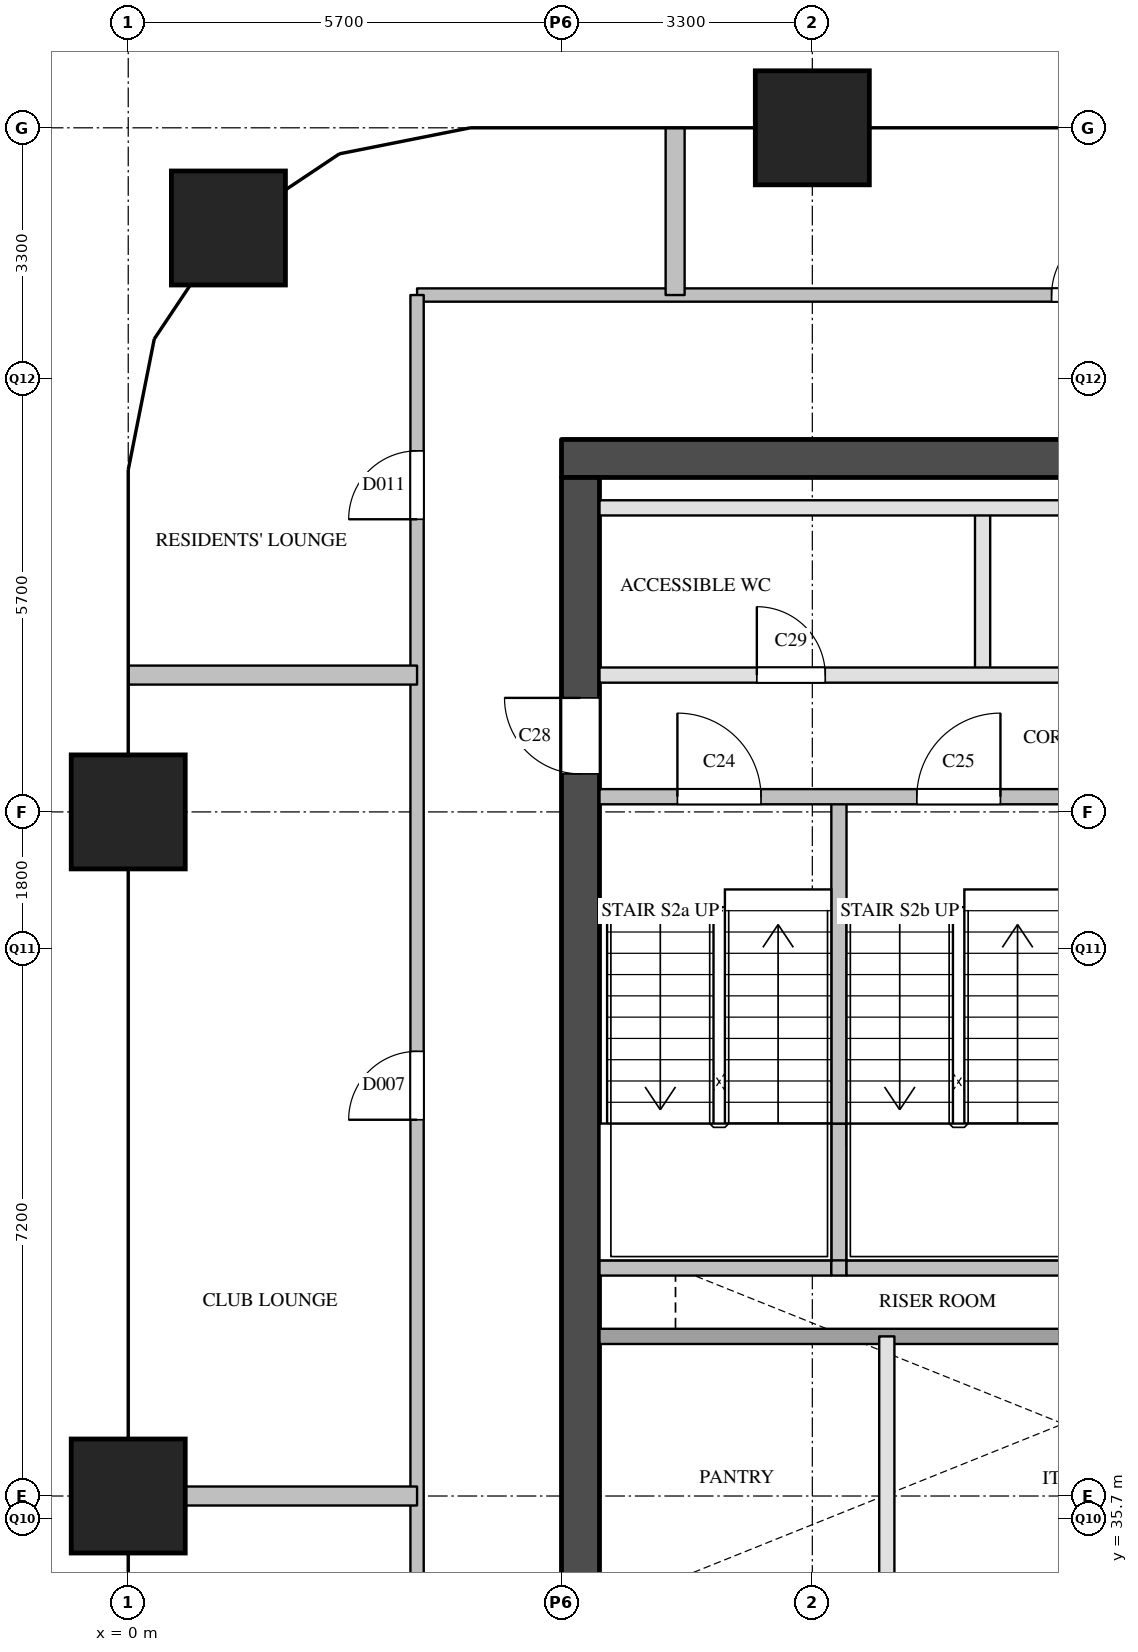
"""IFC4 building model, lengths in metres.
Left out: names, types, materials, properties, quantities, classifications, styles, units other than length and angle.
Written with IfcOpenShell. Run it as: python <this file> out.ifc"""

import sys

from ifc_helpers import new_model, si_unit, direction, frame, frame_2d, origin, origin_2d, place, context, subcontext, project, spatial, rectangle, extrude, element, fill, save


model = new_model("IFC4")
c1 = context("Model", 3, precision=1e-05, world=origin(), true_north=direction((0.0, 1.0)))
c2 = subcontext(c1, "Body", "Model", "MODEL_VIEW")
j1 = project(units=[si_unit("LENGTHUNIT", "METRE"), si_unit("PLANEANGLEUNIT", "RADIAN")], contexts=[c1])
p1 = place(None, origin())
s1 = spatial("IfcSite", under=j1, at=p1, CompositionType="ELEMENT")
p2 = place(p1, origin())
s2 = spatial("IfcBuilding", under=s1, at=p2, CompositionType="ELEMENT")
p3 = place(p2, frame((0.0, 0.0, 185.6)))
s3 = spatial("IfcBuildingStorey", under=s2, at=p3, CompositionType="ELEMENT", Elevation=185.6)
for number, where, z_axis, x_axis in (
    (1, (0.0, 36.0, 0.0), (0.0, 0.0, 1.0), (1.0, 0.0, 0.0)),
    (2, (0.0, 45.0, 0.0), (0.0, 0.0, 1.0), (1.0, 0.0, 0.0)),
    (3, (1.318, 52.682, 0.0), (0.0, 0.0, 1.0), (1.0, 0.0, 0.0)),
    (4, (9.0, 54.0, 0.0), (0.0, 0.0, 1.0), (1.0, 0.0, 0.0)),
):
    element("IfcColumn", number, at=place(p3, frame(where, z_axis=z_axis, x_axis=x_axis)), inside=s3, PredefinedType="COLUMN", context=c2, shape_type="SweptSolid", body=[
        extrude(rectangle(XDim=1.5, YDim=1.5, at=origin_2d()), origin(), (0.0, 0.0, 1.0), 3.9),
    ])
p4 = place(p3, frame((5.7, 49.65, 0.0), z_axis=(0.0, 0.0, 1.0), x_axis=(1.0, 0.0, 0.0)))
e5 = element("IfcWall", 5, at=p4, inside=s3, PredefinedType="SHEAR", context=c2, shape_type="SweptSolid", body=[
    extrude(rectangle(XDim=12.2, YDim=0.5, at=frame_2d((6.1, 0.0))), origin(), (0.0, 0.0, 1.0), 3.6),
])
p5 = place(p3, frame((5.95, 29.1, 0.0), z_axis=(0.0, 0.0, 1.0), x_axis=(0.0, 1.0, 0.0)))
e6 = element("IfcWall", 6, at=p5, inside=s3, PredefinedType="SHEAR", context=c2, shape_type="SweptSolid", body=[
    extrude(rectangle(XDim=20.3, YDim=0.5, at=frame_2d((10.15, 0.0))), origin(), (0.0, 0.0, 1.0), 3.6),
])
p6 = place(p5, frame((3.45, 0.0, 0.0)))
e7 = element("IfcOpeningElement", 7, at=p6, cuts=e6, PredefinedType="OPENING", context=c2, shape_type="SweptSolid", body=[
    extrude(rectangle(XDim=1.0, YDim=2.1, at=frame_2d((0.5, 1.05))), frame((0.0, 0.26, 0.0), z_axis=(0.0, -1.0, 0.0), x_axis=(1.0, 0.0, 0.0)), (0.0, 0.0, 1.0), 0.52),
])
p7 = place(p5, frame((16.4, 0.0, 0.0)))
e8 = element("IfcOpeningElement", 8, at=p7, cuts=e6, PredefinedType="OPENING", context=c2, shape_type="SweptSolid", body=[
    extrude(rectangle(XDim=1.0, YDim=2.1, at=frame_2d((0.5, 1.05))), frame((0.0, 0.26, 0.0), z_axis=(0.0, -1.0, 0.0), x_axis=(1.0, 0.0, 0.0)), (0.0, 0.0, 1.0), 0.52),
])
p8 = place(p3, frame((9.35, 39.0, 0.0), z_axis=(0.0, 0.0, 1.0), x_axis=(0.0, 1.0, 0.0)))
e9 = element("IfcWall", 9, at=p8, inside=s3, PredefinedType="SOLIDWALL", context=c2, shape_type="SweptSolid", body=[
    extrude(rectangle(XDim=1.9, YDim=0.2, at=frame_2d((0.95, 0.0))), origin(), (0.0, 0.0, 1.0), 3.6),
])
p9 = place(p3, frame((9.35, 40.9, 0.0), z_axis=(0.0, 0.0, 1.0), x_axis=(0.0, 1.0, 0.0)))
e10 = element("IfcWall", 10, at=p9, inside=s3, PredefinedType="SOLIDWALL", context=c2, shape_type="SweptSolid", body=[
    extrude(rectangle(XDim=4.3, YDim=0.2, at=frame_2d((2.15, 0.0))), origin(), (0.0, 0.0, 1.0), 3.6),
])
p10 = place(p3, frame((9.98, 33.8, 0.0), z_axis=(0.0, 0.0, 1.0), x_axis=(0.0, 1.0, 0.0)))
e11 = element("IfcWall", 11, at=p10, inside=s3, PredefinedType="PARTITIONING", context=c2, shape_type="SweptSolid", body=[
    extrude(rectangle(XDim=4.3, YDim=0.2, at=frame_2d((2.15, 0.0))), origin(), (0.0, 0.0, 1.0), 3.6),
])
p11 = place(p3, frame((11.24, 46.8, 0.0), z_axis=(0.0, 0.0, 1.0), x_axis=(0.0, 1.0, 0.0)))
e12 = element("IfcWall", 12, at=p11, inside=s3, PredefinedType="PARTITIONING", context=c2, shape_type="SweptSolid", body=[
    extrude(rectangle(XDim=2.2, YDim=0.2, at=frame_2d((1.1, 0.0))), origin(), (0.0, 0.0, 1.0), 3.6),
])
p12 = place(p3, frame((6.2, 38.1, 0.0), z_axis=(0.0, 0.0, 1.0), x_axis=(1.0, 0.0, 0.0)))
e13 = element("IfcWall", 13, at=p12, inside=s3, PredefinedType="SOLIDWALL", context=c2, shape_type="SweptSolid", body=[
    extrude(rectangle(XDim=11.2, YDim=0.2, at=frame_2d((5.6, 0.0))), origin(), (0.0, 0.0, 1.0), 3.6),
])
p13 = place(p12, frame((8.85, 0.0, 0.0)))
e14 = element("IfcOpeningElement", 14, at=p13, cuts=e13, PredefinedType="OPENING", context=c2, shape_type="SweptSolid", body=[
    extrude(rectangle(XDim=1.2, YDim=2.1, at=frame_2d((0.6, 1.05))), frame((0.0, 0.11, 0.0), z_axis=(0.0, -1.0, 0.0), x_axis=(1.0, 0.0, 0.0)), (0.0, 0.0, 1.0), 0.22),
])
p14 = place(p3, frame((6.2, 39.0, 0.0), z_axis=(0.0, 0.0, 1.0), x_axis=(1.0, 0.0, 0.0)))
e15 = element("IfcWall", 15, at=p14, inside=s3, PredefinedType="SOLIDWALL", context=c2, shape_type="SweptSolid", body=[
    extrude(rectangle(XDim=3.05, YDim=0.2, at=frame_2d((1.525, 0.0))), origin(), (0.0, 0.0, 1.0), 3.6),
])
p15 = place(p3, frame((9.25, 39.0, 0.0), z_axis=(0.0, 0.0, 1.0), x_axis=(1.0, 0.0, 0.0)))
e16 = element("IfcWall", 16, at=p15, inside=s3, PredefinedType="SOLIDWALL", context=c2, shape_type="SweptSolid", body=[
    extrude(rectangle(XDim=0.2, YDim=0.2, at=frame_2d((0.1, 0.0))), origin(), (0.0, 0.0, 1.0), 3.6),
])
p16 = place(p3, frame((9.45, 39.0, 0.0), z_axis=(0.0, 0.0, 1.0), x_axis=(1.0, 0.0, 0.0)))
e17 = element("IfcWall", 17, at=p16, inside=s3, PredefinedType="SOLIDWALL", context=c2, shape_type="SweptSolid", body=[
    extrude(rectangle(XDim=3.05, YDim=0.2, at=frame_2d((1.525, 0.0))), origin(), (0.0, 0.0, 1.0), 3.6),
])
p17 = place(p3, frame((6.2, 45.2, 0.0), z_axis=(0.0, 0.0, 1.0), x_axis=(1.0, 0.0, 0.0)))
e18 = element("IfcWall", 18, at=p17, inside=s3, PredefinedType="SOLIDWALL", context=c2, shape_type="SweptSolid", body=[
    extrude(rectangle(XDim=6.3, YDim=0.2, at=frame_2d((3.15, 0.0))), origin(), (0.0, 0.0, 1.0), 3.6),
])
p18 = place(p17, frame((1.025, 0.0, 0.0)))
e19 = element("IfcOpeningElement", 19, at=p18, cuts=e18, PredefinedType="OPENING", context=c2, shape_type="SweptSolid", body=[
    extrude(rectangle(XDim=1.1, YDim=2.1, at=frame_2d((0.55, 1.05))), frame((0.0, 0.11, 0.0), z_axis=(0.0, -1.0, 0.0), x_axis=(1.0, 0.0, 0.0)), (0.0, 0.0, 1.0), 0.22),
])
p19 = place(p17, frame((4.175, 0.0, 0.0)))
e20 = element("IfcOpeningElement", 20, at=p19, cuts=e18, PredefinedType="OPENING", context=c2, shape_type="SweptSolid", body=[
    extrude(rectangle(XDim=1.1, YDim=2.1, at=frame_2d((0.55, 1.05))), frame((0.0, 0.11, 0.0), z_axis=(0.0, -1.0, 0.0), x_axis=(1.0, 0.0, 0.0)), (0.0, 0.0, 1.0), 0.22),
])
p20 = place(p3, frame((6.2, 46.8, 0.0), z_axis=(0.0, 0.0, 1.0), x_axis=(1.0, 0.0, 0.0)))
e21 = element("IfcWall", 21, at=p20, inside=s3, PredefinedType="PARTITIONING", context=c2, shape_type="SweptSolid", body=[
    extrude(rectangle(XDim=11.2, YDim=0.2, at=frame_2d((5.6, 0.0))), origin(), (0.0, 0.0, 1.0), 3.6),
])
p21 = place(p20, frame((2.07, 0.0, 0.0)))
e22 = element("IfcOpeningElement", 22, at=p21, cuts=e21, PredefinedType="OPENING", context=c2, shape_type="SweptSolid", body=[
    extrude(rectangle(XDim=0.9, YDim=2.1, at=frame_2d((0.45, 1.05))), frame((0.0, 0.11, 0.0), z_axis=(0.0, -1.0, 0.0), x_axis=(1.0, 0.0, 0.0)), (0.0, 0.0, 1.0), 0.22),
])
p22 = place(p20, frame((7.67, 0.0, 0.0)))
e23 = element("IfcOpeningElement", 23, at=p22, cuts=e21, PredefinedType="OPENING", context=c2, shape_type="SweptSolid", body=[
    extrude(rectangle(XDim=0.9, YDim=2.1, at=frame_2d((0.45, 1.05))), frame((0.0, 0.11, 0.0), z_axis=(0.0, -1.0, 0.0), x_axis=(1.0, 0.0, 0.0)), (0.0, 0.0, 1.0), 0.22),
])
p23 = place(p3, frame((6.2, 49.0, 0.0), z_axis=(0.0, 0.0, 1.0), x_axis=(1.0, 0.0, 0.0)))
e24 = element("IfcWall", 24, at=p23, inside=s3, PredefinedType="PARTITIONING", context=c2, shape_type="SweptSolid", body=[
    extrude(rectangle(XDim=11.2, YDim=0.2, at=frame_2d((5.6, 0.0))), origin(), (0.0, 0.0, 1.0), 3.6),
])
p24 = place(p3, frame((3.8, 51.8, 0.0), z_axis=(0.0, 0.0, 1.0), x_axis=(1.0, 0.0, 0.0)))
e25 = element("IfcWall", 25, at=p24, inside=s3, PredefinedType="PARTITIONING", context=c2, shape_type="SweptSolid", body=[
    extrude(rectangle(XDim=16.0, YDim=0.175, at=frame_2d((8.0, 0.0))), origin(), (0.0, 0.0, 1.0), 3.6),
])
p25 = place(p24, frame((8.348, 0.0, 0.0)))
e26 = element("IfcOpeningElement", 26, at=p25, cuts=e25, PredefinedType="OPENING", context=c2, shape_type="SweptSolid", body=[
    extrude(rectangle(XDim=0.9, YDim=2.1, at=frame_2d((0.45, 1.05))), frame((0.0, 0.097, 0.0), z_axis=(0.0, -1.0, 0.0), x_axis=(1.0, 0.0, 0.0)), (0.0, 0.0, 1.0), 0.195),
])
p26 = place(p3, frame((3.8, 28.5, 0.0), z_axis=(0.0, 0.0, 1.0), x_axis=(0.0, 1.0, 0.0)))
e27 = element("IfcWall", 27, at=p26, inside=s3, PredefinedType="PARTITIONING", context=c2, shape_type="SweptSolid", body=[
    extrude(rectangle(XDim=23.3, YDim=0.175, at=frame_2d((11.65, 0.0))), origin(), (0.0, 0.0, 1.0), 3.6),
])
p27 = place(p26, frame((3.3, 0.0, 0.0)))
e28 = element("IfcOpeningElement", 28, at=p27, cuts=e27, PredefinedType="OPENING", context=c2, shape_type="SweptSolid", body=[
    extrude(rectangle(XDim=0.9, YDim=2.1, at=frame_2d((0.45, 1.05))), frame((0.0, 0.097, 0.0), z_axis=(0.0, -1.0, 0.0), x_axis=(1.0, 0.0, 0.0)), (0.0, 0.0, 1.0), 0.195),
])
p28 = place(p26, frame((12.45, 0.0, 0.0)))
e29 = element("IfcOpeningElement", 29, at=p28, cuts=e27, PredefinedType="OPENING", context=c2, shape_type="SweptSolid", body=[
    extrude(rectangle(XDim=0.9, YDim=2.1, at=frame_2d((0.45, 1.05))), frame((0.0, 0.097, 0.0), z_axis=(0.0, -1.0, 0.0), x_axis=(1.0, 0.0, 0.0)), (0.0, 0.0, 1.0), 0.195),
])
p29 = place(p26, frame((20.35, 0.0, 0.0)))
e30 = element("IfcOpeningElement", 30, at=p29, cuts=e27, PredefinedType="OPENING", context=c2, shape_type="SweptSolid", body=[
    extrude(rectangle(XDim=0.9, YDim=2.1, at=frame_2d((0.45, 1.05))), frame((0.0, 0.097, 0.0), z_axis=(0.0, -1.0, 0.0), x_axis=(1.0, 0.0, 0.0)), (0.0, 0.0, 1.0), 0.195),
])
p30 = place(p3, frame((0.0, 36.0, 0.0), z_axis=(0.0, 0.0, 1.0), x_axis=(1.0, 0.0, 0.0)))
e31 = element("IfcWall", 31, at=p30, inside=s3, PredefinedType="PARTITIONING", context=c2, shape_type="SweptSolid", body=[
    extrude(rectangle(XDim=3.8, YDim=0.25, at=frame_2d((1.9, 0.0))), origin(), (0.0, 0.0, 1.0), 3.6),
])
p31 = place(p3, frame((0.0, 46.8, 0.0), z_axis=(0.0, 0.0, 1.0), x_axis=(1.0, 0.0, 0.0)))
e32 = element("IfcWall", 32, at=p31, inside=s3, PredefinedType="PARTITIONING", context=c2, shape_type="SweptSolid", body=[
    extrude(rectangle(XDim=3.8, YDim=0.25, at=frame_2d((1.9, 0.0))), origin(), (0.0, 0.0, 1.0), 2.6),
])
p32 = place(p3, frame((7.195, 51.8, 0.0), z_axis=(0.0, 0.0, 1.0), x_axis=(0.0, 1.0, 0.0)))
e33 = element("IfcWall", 33, at=p32, inside=s3, PredefinedType="PARTITIONING", context=c2, shape_type="SweptSolid", body=[
    extrude(rectangle(XDim=2.2, YDim=0.25, at=frame_2d((1.1, 0.0))), origin(), (0.0, 0.0, 1.0), 2.6),
])
p33 = place(p18, origin())
e34 = element("IfcDoor", 34, at=p33, inside=s3, OperationType="SINGLE_SWING_LEFT", PredefinedType="DOOR", context=c2, shape_type="SweptSolid", body=[
    extrude(rectangle(XDim=1.1, YDim=2.1, at=frame_2d((0.55, 1.05))), frame((0.0, 0.025, 0.0), z_axis=(0.0, -1.0, 0.0), x_axis=(1.0, 0.0, 0.0)), (0.0, 0.0, 1.0), 0.05),
])
fill(e19, e34)
p34 = place(p19, origin())
e35 = element("IfcDoor", 35, at=p34, inside=s3, OperationType="SINGLE_SWING_RIGHT", PredefinedType="DOOR", context=c2, shape_type="SweptSolid", body=[
    extrude(rectangle(XDim=1.1, YDim=2.1, at=frame_2d((0.55, 1.05))), frame((0.0, 0.025, 0.0), z_axis=(0.0, -1.0, 0.0), x_axis=(1.0, 0.0, 0.0)), (0.0, 0.0, 1.0), 0.05),
])
fill(e20, e35)
p35 = place(p7, origin())
e36 = element("IfcDoor", 36, at=p35, inside=s3, OperationType="SINGLE_SWING_RIGHT", PredefinedType="DOOR", context=c2, shape_type="SweptSolid", body=[
    extrude(rectangle(XDim=1.0, YDim=2.1, at=frame_2d((0.5, 1.05))), frame((0.0, 0.025, 0.0), z_axis=(0.0, -1.0, 0.0), x_axis=(1.0, 0.0, 0.0)), (0.0, 0.0, 1.0), 0.05),
])
fill(e8, e36)
p36 = place(p21, origin())
e37 = element("IfcDoor", 37, at=p36, inside=s3, OperationType="SINGLE_SWING_LEFT", PredefinedType="DOOR", context=c2, shape_type="SweptSolid", body=[
    extrude(rectangle(XDim=0.9, YDim=2.1, at=frame_2d((0.45, 1.05))), frame((0.0, 0.025, 0.0), z_axis=(0.0, -1.0, 0.0), x_axis=(1.0, 0.0, 0.0)), (0.0, 0.0, 1.0), 0.05),
])
fill(e22, e37)
p37 = place(p28, origin())
e38 = element("IfcDoor", 38, at=p37, inside=s3, OperationType="SINGLE_SWING_LEFT", PredefinedType="DOOR", context=c2, shape_type="SweptSolid", body=[
    extrude(rectangle(XDim=0.9, YDim=2.1, at=frame_2d((0.45, 1.05))), frame((0.0, 0.025, 0.0), z_axis=(0.0, -1.0, 0.0), x_axis=(1.0, 0.0, 0.0)), (0.0, 0.0, 1.0), 0.05),
])
fill(e29, e38)
p38 = place(p29, origin())
e39 = element("IfcDoor", 39, at=p38, inside=s3, OperationType="SINGLE_SWING_LEFT", PredefinedType="DOOR", context=c2, shape_type="SweptSolid", body=[
    extrude(rectangle(XDim=0.9, YDim=2.1, at=frame_2d((0.45, 1.05))), frame((0.0, 0.025, 0.0), z_axis=(0.0, -1.0, 0.0), x_axis=(1.0, 0.0, 0.0)), (0.0, 0.0, 1.0), 0.05),
])
fill(e30, e39)
p39 = place(p25, origin())
e40 = element("IfcDoor", 40, at=p39, inside=s3, OperationType="SINGLE_SWING_RIGHT", PredefinedType="DOOR", context=c2, shape_type="SweptSolid", body=[
    extrude(rectangle(XDim=0.9, YDim=2.1, at=frame_2d((0.45, 1.05))), frame((0.0, 0.025, 0.0), z_axis=(0.0, -1.0, 0.0), x_axis=(1.0, 0.0, 0.0)), (0.0, 0.0, 1.0), 0.05),
])
fill(e26, e40)
save(model, sys.argv[1])
